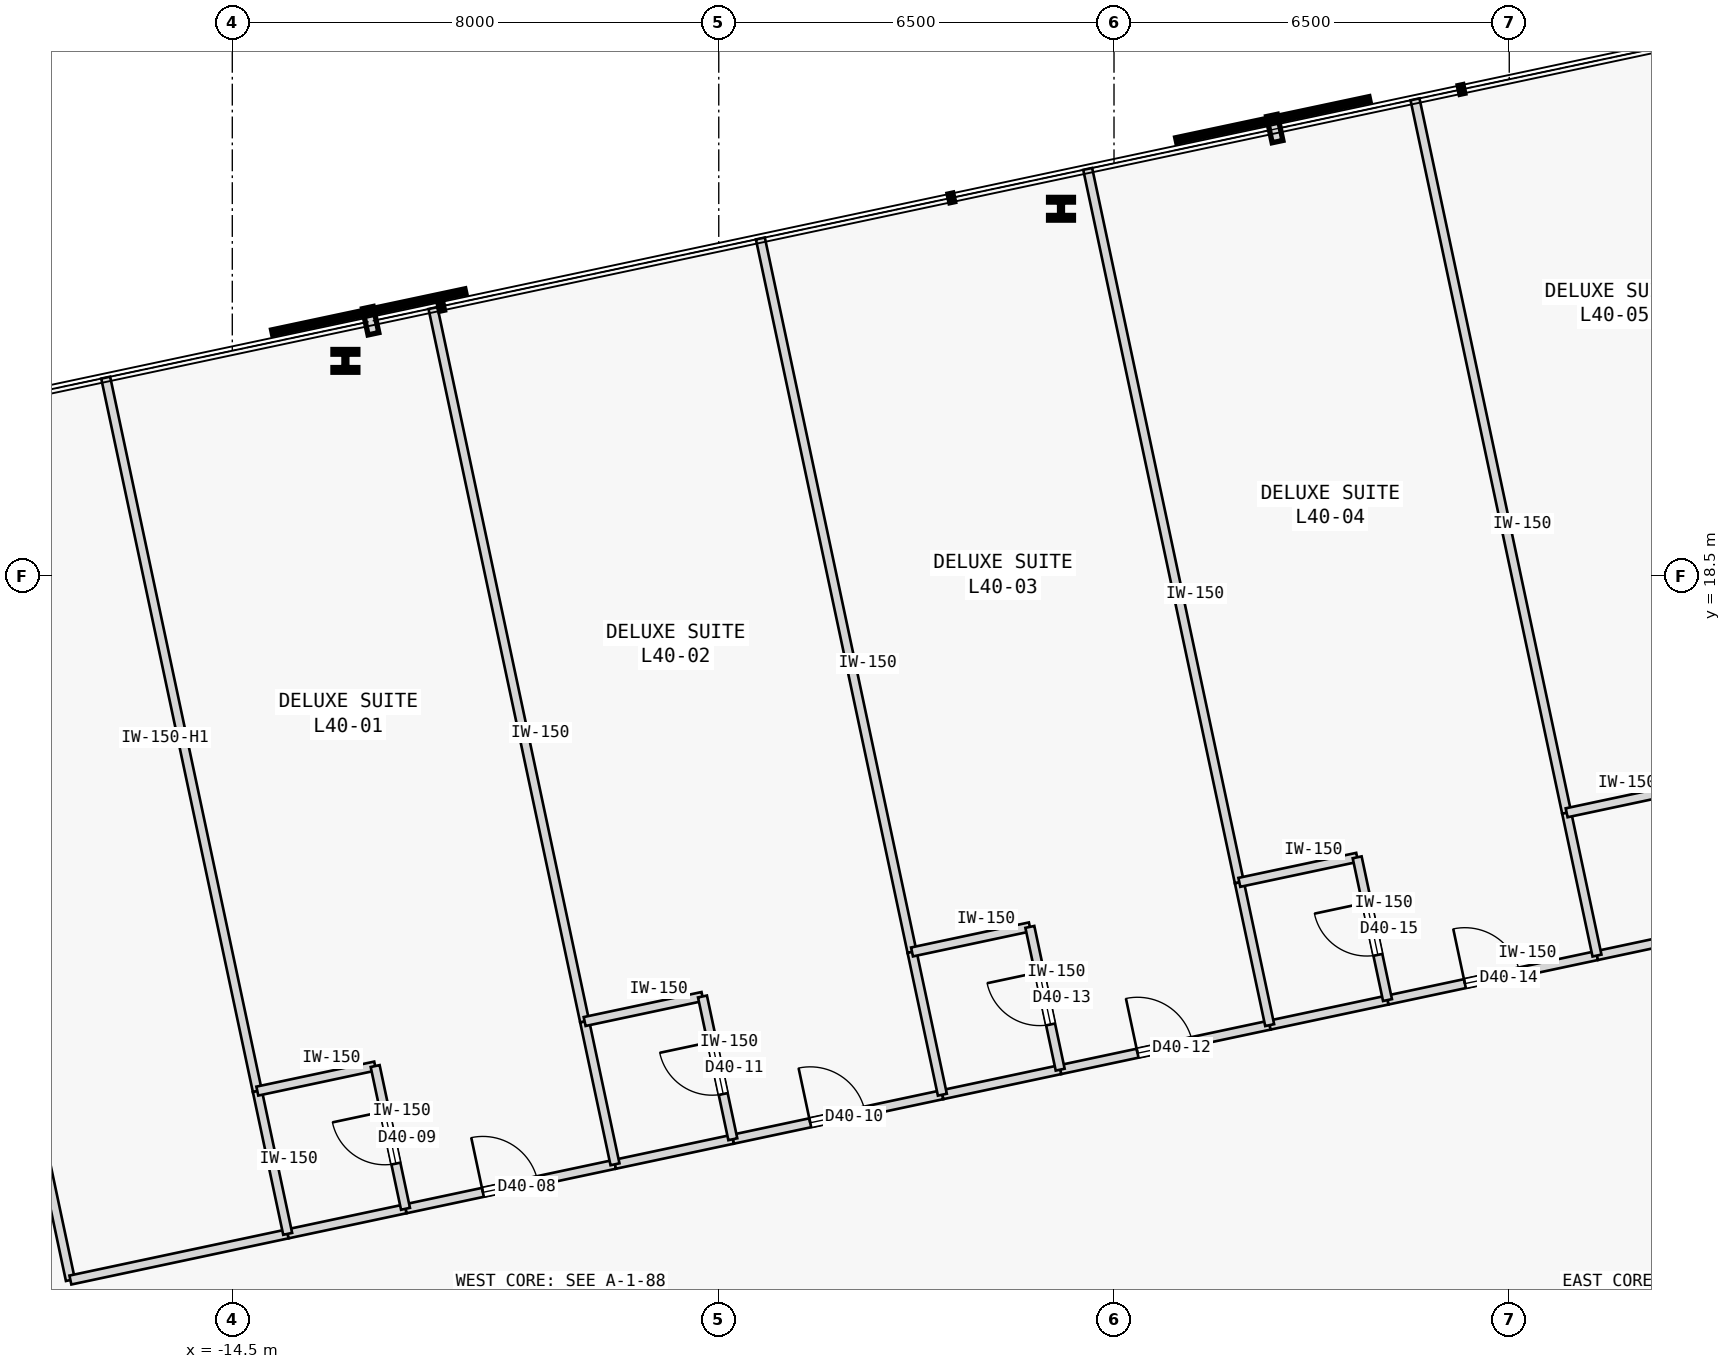
"""IFC4 building model, lengths in metres.
Left out: names, types, materials, properties, quantities, classifications, styles, units other than length and angle.
Written with IfcOpenShell. Run it as: python <this file> out.ifc"""

import sys

from ifc_helpers import new_model, si_unit, direction, frame, frame_2d, origin, origin_2d, place, context, subcontext, project, spatial, rectangle, i_section, extrude, element, fill, save


model = new_model("IFC4")
c1 = context("Model", 3, precision=1e-05, world=origin(), true_north=direction((0.0, 1.0)))
c2 = subcontext(c1, "Body", "Model", "MODEL_VIEW")
j1 = project(units=[si_unit("LENGTHUNIT", "METRE"), si_unit("PLANEANGLEUNIT", "RADIAN")], contexts=[c1])
p1 = place(None, origin())
s1 = spatial("IfcSite", under=j1, at=p1, CompositionType="ELEMENT")
p2 = place(p1, origin())
s2 = spatial("IfcBuilding", under=s1, at=p2, CompositionType="ELEMENT")
p3 = place(p2, frame((0.0, 0.0, 158.2)))
s3 = spatial("IfcBuildingStorey", under=s2, at=p3, CompositionType="ELEMENT", Elevation=158.2)
for number, where, z_axis, x_axis in (
    (1, (-0.872, 24.543, 0.0), (0.0, 0.0, 1.0), (1.0, 0.0, 0.0)),
    (2, (-12.64, 22.042, 0.0), (0.0, 0.0, 1.0), (1.0, 0.0, 0.0)),
):
    element("IfcColumn", number, at=place(p3, frame(where, z_axis=z_axis, x_axis=x_axis)), inside=s3, PredefinedType="COLUMN", context=c2, shape_type="SweptSolid", body=[
        extrude(i_section(OverallWidth=0.409, OverallDepth=0.374, WebThickness=0.048, FlangeThickness=0.077, FilletRadius=0.015, at=origin_2d()), origin(), (0.0, 0.0, 1.0), 3.4),
    ])
p4 = place(p3, frame((-17.162, 6.926, 0.0), z_axis=(0.0, 0.0, 1.0), x_axis=(-0.207911421929, 0.978147657888, 0.0)))
e3 = element("IfcWall", 3, at=p4, inside=s3, PredefinedType="PARTITIONING", context=c2, shape_type="SweptSolid", body=[
    extrude(rectangle(XDim=13.195, YDim=0.15, at=frame_2d((6.598, 0.0))), origin(), (0.0, 0.0, 1.0), 2.725),
])
p5 = place(p4, frame((6.137, 0.0, 0.0)))
e4 = element("IfcOpeningElement", 4, at=p5, cuts=e3, PredefinedType="OPENING", context=c2, shape_type="SweptSolid", body=[
    extrude(rectangle(XDim=0.92, YDim=2.15, at=frame_2d((0.46, 1.075))), frame((0.0, 0.085, 0.0), z_axis=(0.0, -1.0, 0.0), x_axis=(1.0, 0.0, 0.0)), (0.0, 0.0, 1.0), 0.17),
])
p6 = place(p3, frame((-17.162, 6.926, 0.0), z_axis=(0.0, 0.0, 1.0), x_axis=(0.978147299501, 0.207913108004, 0.0)))
e5 = element("IfcWall", 5, at=p6, inside=s3, PredefinedType="PARTITIONING", context=c2, shape_type="SweptSolid", body=[
    extrude(rectangle(XDim=3.653, YDim=0.15, at=frame_2d((1.827, 0.0))), origin(), (0.0, 0.0, 1.0), 3.175),
])
p7 = place(p3, frame((-11.652, 8.097, 0.0), z_axis=(0.0, 0.0, 1.0), x_axis=(0.978153036861, 0.207886114205, 0.0)))
e6 = element("IfcWall", 6, at=p7, inside=s3, PredefinedType="PARTITIONING", context=c2, shape_type="SweptSolid", body=[
    extrude(rectangle(XDim=3.522, YDim=0.15, at=frame_2d((1.761, 0.0))), origin(), (0.0, 0.0, 1.0), 3.175),
])
p8 = place(p7, frame((1.301, 0.0, 0.0)))
e7 = element("IfcOpeningElement", 7, at=p8, cuts=e6, PredefinedType="OPENING", context=c2, shape_type="SweptSolid", body=[
    extrude(rectangle(XDim=0.92, YDim=2.15, at=frame_2d((0.46, 1.075))), frame((0.0, 0.085, 0.0), z_axis=(0.0, -1.0, 0.0), x_axis=(1.0, 0.0, 0.0)), (0.0, 0.0, 1.0), 0.17),
])
p9 = place(p3, frame((-13.589, 7.685, 0.0), z_axis=(0.0, 0.0, 1.0), x_axis=(0.97811873796, 0.208047433175, 0.0)))
e8 = element("IfcWall", 8, at=p9, inside=s3, PredefinedType="PARTITIONING", context=c2, shape_type="SweptSolid", body=[
    extrude(rectangle(XDim=1.981, YDim=0.15, at=frame_2d((0.99, 0.0))), origin(), (0.0, 0.0, 1.0), 3.175),
])
p10 = place(p3, frame((-6.269, 9.241, 0.0), z_axis=(0.0, 0.0, 1.0), x_axis=(0.978150924733, 0.207896052016, 0.0)))
e9 = element("IfcWall", 9, at=p10, inside=s3, PredefinedType="PARTITIONING", context=c2, shape_type="SweptSolid", body=[
    extrude(rectangle(XDim=3.523, YDim=0.15, at=frame_2d((1.761, 0.0))), origin(), (0.0, 0.0, 1.0), 3.175),
])
p11 = place(p10, frame((1.302, 0.0, 0.0)))
e10 = element("IfcOpeningElement", 10, at=p11, cuts=e9, PredefinedType="OPENING", context=c2, shape_type="SweptSolid", body=[
    extrude(rectangle(XDim=0.92, YDim=2.15, at=frame_2d((0.46, 1.075))), frame((0.0, 0.085, 0.0), z_axis=(0.0, -1.0, 0.0), x_axis=(1.0, 0.0, 0.0)), (0.0, 0.0, 1.0), 0.17),
])
p12 = place(p3, frame((-8.207, 8.83, 0.0), z_axis=(0.0, 0.0, 1.0), x_axis=(0.978149140323, 0.20790444749, 0.0)))
e11 = element("IfcWall", 11, at=p12, inside=s3, PredefinedType="PARTITIONING", context=c2, shape_type="SweptSolid", body=[
    extrude(rectangle(XDim=1.981, YDim=0.15, at=frame_2d((0.99, 0.0))), origin(), (0.0, 0.0, 1.0), 3.175),
])
p13 = place(p3, frame((-0.885, 10.386, 0.0), z_axis=(0.0, 0.0, 1.0), x_axis=(0.978153036861, 0.207886114205, 0.0)))
e12 = element("IfcWall", 12, at=p13, inside=s3, PredefinedType="PARTITIONING", context=c2, shape_type="SweptSolid", body=[
    extrude(rectangle(XDim=3.522, YDim=0.15, at=frame_2d((1.761, 0.0))), origin(), (0.0, 0.0, 1.0), 3.175),
])
p14 = place(p13, frame((1.301, 0.0, 0.0)))
e13 = element("IfcOpeningElement", 13, at=p14, cuts=e12, PredefinedType="OPENING", context=c2, shape_type="SweptSolid", body=[
    extrude(rectangle(XDim=0.92, YDim=2.15, at=frame_2d((0.46, 1.075))), frame((0.0, 0.085, 0.0), z_axis=(0.0, -1.0, 0.0), x_axis=(1.0, 0.0, 0.0)), (0.0, 0.0, 1.0), 0.17),
])
p15 = place(p3, frame((-2.823, 9.974, 0.0), z_axis=(0.0, 0.0, 1.0), x_axis=(0.978149140323, 0.20790444749, 0.0)))
e14 = element("IfcWall", 14, at=p15, inside=s3, PredefinedType="PARTITIONING", context=c2, shape_type="SweptSolid", body=[
    extrude(rectangle(XDim=1.981, YDim=0.15, at=frame_2d((0.99, 0.0))), origin(), (0.0, 0.0, 1.0), 3.175),
])
p16 = place(p3, frame((4.498, 11.53, 0.0), z_axis=(0.0, 0.0, 1.0), x_axis=(0.978135941404, 0.207966536089, 0.0)))
e15 = element("IfcWall", 15, at=p16, inside=s3, PredefinedType="PARTITIONING", context=c2, shape_type="SweptSolid", body=[
    extrude(rectangle(XDim=3.522, YDim=0.15, at=frame_2d((1.761, 0.0))), origin(), (0.0, 0.0, 1.0), 3.175),
])
p17 = place(p16, frame((1.301, 0.0, 0.0)))
e16 = element("IfcOpeningElement", 16, at=p17, cuts=e15, PredefinedType="OPENING", context=c2, shape_type="SweptSolid", body=[
    extrude(rectangle(XDim=0.92, YDim=2.15, at=frame_2d((0.46, 1.075))), frame((0.0, 0.085, 0.0), z_axis=(0.0, -1.0, 0.0), x_axis=(1.0, 0.0, 0.0)), (0.0, 0.0, 1.0), 0.17),
])
p18 = place(p3, frame((2.56, 11.118, 0.0), z_axis=(0.0, 0.0, 1.0), x_axis=(0.978149140323, 0.20790444749, 0.0)))
e17 = element("IfcWall", 17, at=p18, inside=s3, PredefinedType="PARTITIONING", context=c2, shape_type="SweptSolid", body=[
    extrude(rectangle(XDim=1.981, YDim=0.15, at=frame_2d((0.99, 0.0))), origin(), (0.0, 0.0, 1.0), 3.175),
])
p19 = place(p3, frame((7.943, 12.262, 0.0), z_axis=(0.0, 0.0, 1.0), x_axis=(0.978146728319, 0.207915795165, 0.0)))
e18 = element("IfcWall", 18, at=p19, inside=s3, PredefinedType="PARTITIONING", context=c2, shape_type="SweptSolid", body=[
    extrude(rectangle(XDim=2.15, YDim=0.15, at=frame_2d((1.075, 0.0))), origin(), (0.0, 0.0, 1.0), 3.175),
])
p20 = place(p3, frame((-14.088, 10.033, 0.0), z_axis=(0.0, 0.0, 1.0), x_axis=(-0.207910848762, 0.978147779718, 0.0)))
e19 = element("IfcWall", 19, at=p20, inside=s3, PredefinedType="PARTITIONING", context=c2, shape_type="SweptSolid", body=[
    extrude(rectangle(XDim=11.995, YDim=0.15, at=frame_2d((5.998, 0.0))), origin(), (0.0, 0.0, 1.0), 2.725),
])
p21 = place(p3, frame((-13.589, 7.685, 0.0), z_axis=(0.0, 0.0, 1.0), x_axis=(-0.207917150959, 0.978146440129, 0.0)))
e20 = element("IfcWall", 20, at=p21, inside=s3, PredefinedType="PARTITIONING", context=c2, shape_type="SweptSolid", body=[
    extrude(rectangle(XDim=2.4, YDim=0.15, at=frame_2d((1.2, 0.0))), origin(), (0.0, 0.0, 1.0), 3.175),
])
p22 = place(p3, frame((-14.088, 10.033, 0.0), z_axis=(0.0, 0.0, 1.0), x_axis=(0.978149140323, 0.20790444749, 0.0)))
e21 = element("IfcWall", 21, at=p22, inside=s3, PredefinedType="PARTITIONING", context=c2, shape_type="SweptSolid", body=[
    extrude(rectangle(XDim=1.981, YDim=0.15, at=frame_2d((0.99, 0.0))), origin(), (0.0, 0.0, 1.0), 3.175),
])
p23 = place(p3, frame((-11.652, 8.097, 0.0), z_axis=(0.0, 0.0, 1.0), x_axis=(-0.207840504985, 0.978162729042, 0.0)))
e22 = element("IfcWall", 22, at=p23, inside=s3, PredefinedType="PARTITIONING", context=c2, shape_type="SweptSolid", body=[
    extrude(rectangle(XDim=2.4, YDim=0.15, at=frame_2d((1.2, 0.0))), origin(), (0.0, 0.0, 1.0), 3.175),
])
p24 = place(p23, frame((0.76, 0.0, 0.0)))
e23 = element("IfcOpeningElement", 23, at=p24, cuts=e22, PredefinedType="OPENING", context=c2, shape_type="SweptSolid", body=[
    extrude(rectangle(XDim=0.88, YDim=2.15, at=frame_2d((0.44, 1.075))), frame((0.0, 0.085, 0.0), z_axis=(0.0, -1.0, 0.0), x_axis=(1.0, 0.0, 0.0)), (0.0, 0.0, 1.0), 0.17),
])
p25 = place(p3, frame((-8.706, 11.177, 0.0), z_axis=(0.0, 0.0, 1.0), x_axis=(-0.207910848762, 0.978147779718, 0.0)))
e24 = element("IfcWall", 24, at=p25, inside=s3, PredefinedType="PARTITIONING", context=c2, shape_type="SweptSolid", body=[
    extrude(rectangle(XDim=11.995, YDim=0.15, at=frame_2d((5.998, 0.0))), origin(), (0.0, 0.0, 1.0), 3.175),
])
p26 = place(p3, frame((-8.207, 8.83, 0.0), z_axis=(0.0, 0.0, 1.0), x_axis=(-0.207937840262, 0.978142042133, 0.0)))
e25 = element("IfcWall", 25, at=p26, inside=s3, PredefinedType="PARTITIONING", context=c2, shape_type="SweptSolid", body=[
    extrude(rectangle(XDim=2.4, YDim=0.15, at=frame_2d((1.2, 0.0))), origin(), (0.0, 0.0, 1.0), 3.175),
])
p27 = place(p3, frame((-8.706, 11.177, 0.0), z_axis=(0.0, 0.0, 1.0), x_axis=(0.978149140323, 0.20790444749, 0.0)))
e26 = element("IfcWall", 26, at=p27, inside=s3, PredefinedType="PARTITIONING", context=c2, shape_type="SweptSolid", body=[
    extrude(rectangle(XDim=1.981, YDim=0.15, at=frame_2d((0.99, 0.0))), origin(), (0.0, 0.0, 1.0), 3.175),
])
p28 = place(p3, frame((-6.269, 9.241, 0.0), z_axis=(0.0, 0.0, 1.0), x_axis=(-0.207937840262, 0.978142042133, 0.0)))
e27 = element("IfcWall", 27, at=p28, inside=s3, PredefinedType="PARTITIONING", context=c2, shape_type="SweptSolid", body=[
    extrude(rectangle(XDim=2.4, YDim=0.15, at=frame_2d((1.2, 0.0))), origin(), (0.0, 0.0, 1.0), 3.175),
])
p29 = place(p28, frame((0.76, 0.0, 0.0)))
e28 = element("IfcOpeningElement", 28, at=p29, cuts=e27, PredefinedType="OPENING", context=c2, shape_type="SweptSolid", body=[
    extrude(rectangle(XDim=0.88, YDim=2.15, at=frame_2d((0.44, 1.075))), frame((0.0, 0.085, 0.0), z_axis=(0.0, -1.0, 0.0), x_axis=(1.0, 0.0, 0.0)), (0.0, 0.0, 1.0), 0.17),
])
p30 = place(p3, frame((-3.322, 12.321, 0.0), z_axis=(0.0, 0.0, 1.0), x_axis=(-0.207910848762, 0.978147779718, 0.0)))
e29 = element("IfcWall", 29, at=p30, inside=s3, PredefinedType="PARTITIONING", context=c2, shape_type="SweptSolid", body=[
    extrude(rectangle(XDim=11.995, YDim=0.15, at=frame_2d((5.998, 0.0))), origin(), (0.0, 0.0, 1.0), 3.175),
])
p31 = place(p3, frame((-2.823, 9.974, 0.0), z_axis=(0.0, 0.0, 1.0), x_axis=(-0.207937840262, 0.978142042133, 0.0)))
e30 = element("IfcWall", 30, at=p31, inside=s3, PredefinedType="PARTITIONING", context=c2, shape_type="SweptSolid", body=[
    extrude(rectangle(XDim=2.4, YDim=0.15, at=frame_2d((1.2, 0.0))), origin(), (0.0, 0.0, 1.0), 3.175),
])
p32 = place(p3, frame((-3.322, 12.321, 0.0), z_axis=(0.0, 0.0, 1.0), x_axis=(0.978124071753, 0.208022355187, 0.0)))
e31 = element("IfcWall", 31, at=p32, inside=s3, PredefinedType="PARTITIONING", context=c2, shape_type="SweptSolid", body=[
    extrude(rectangle(XDim=1.981, YDim=0.15, at=frame_2d((0.991, 0.0))), origin(), (0.0, 0.0, 1.0), 3.175),
])
p33 = place(p3, frame((-0.885, 10.386, 0.0), z_axis=(0.0, 0.0, 1.0), x_axis=(-0.207917150959, 0.978146440129, 0.0)))
e32 = element("IfcWall", 32, at=p33, inside=s3, PredefinedType="PARTITIONING", context=c2, shape_type="SweptSolid", body=[
    extrude(rectangle(XDim=2.4, YDim=0.15, at=frame_2d((1.2, 0.0))), origin(), (0.0, 0.0, 1.0), 3.175),
])
p34 = place(p33, frame((0.76, 0.0, 0.0)))
e33 = element("IfcOpeningElement", 33, at=p34, cuts=e32, PredefinedType="OPENING", context=c2, shape_type="SweptSolid", body=[
    extrude(rectangle(XDim=0.88, YDim=2.15, at=frame_2d((0.44, 1.075))), frame((0.0, 0.085, 0.0), z_axis=(0.0, -1.0, 0.0), x_axis=(1.0, 0.0, 0.0)), (0.0, 0.0, 1.0), 0.17),
])
p35 = place(p3, frame((2.061, 13.466, 0.0), z_axis=(0.0, 0.0, 1.0), x_axis=(-0.207910848762, 0.978147779718, 0.0)))
e34 = element("IfcWall", 34, at=p35, inside=s3, PredefinedType="PARTITIONING", context=c2, shape_type="SweptSolid", body=[
    extrude(rectangle(XDim=11.995, YDim=0.15, at=frame_2d((5.998, 0.0))), origin(), (0.0, 0.0, 1.0), 3.175),
])
p36 = place(p3, frame((2.56, 11.118, 0.0), z_axis=(0.0, 0.0, 1.0), x_axis=(-0.207917150959, 0.978146440129, 0.0)))
e35 = element("IfcWall", 35, at=p36, inside=s3, PredefinedType="PARTITIONING", context=c2, shape_type="SweptSolid", body=[
    extrude(rectangle(XDim=2.4, YDim=0.15, at=frame_2d((1.2, 0.0))), origin(), (0.0, 0.0, 1.0), 3.175),
])
p37 = place(p3, frame((2.061, 13.466, 0.0), z_axis=(0.0, 0.0, 1.0), x_axis=(0.978149140323, 0.20790444749, 0.0)))
e36 = element("IfcWall", 36, at=p37, inside=s3, PredefinedType="PARTITIONING", context=c2, shape_type="SweptSolid", body=[
    extrude(rectangle(XDim=1.981, YDim=0.15, at=frame_2d((0.99, 0.0))), origin(), (0.0, 0.0, 1.0), 3.175),
])
p38 = place(p3, frame((4.498, 11.53, 0.0), z_axis=(0.0, 0.0, 1.0), x_axis=(-0.207917150959, 0.978146440129, 0.0)))
e37 = element("IfcWall", 37, at=p38, inside=s3, PredefinedType="PARTITIONING", context=c2, shape_type="SweptSolid", body=[
    extrude(rectangle(XDim=2.4, YDim=0.15, at=frame_2d((1.2, 0.0))), origin(), (0.0, 0.0, 1.0), 3.175),
])
p39 = place(p38, frame((0.76, 0.0, 0.0)))
e38 = element("IfcOpeningElement", 38, at=p39, cuts=e37, PredefinedType="OPENING", context=c2, shape_type="SweptSolid", body=[
    extrude(rectangle(XDim=0.88, YDim=2.15, at=frame_2d((0.44, 1.075))), frame((0.0, 0.085, 0.0), z_axis=(0.0, -1.0, 0.0), x_axis=(1.0, 0.0, 0.0)), (0.0, 0.0, 1.0), 0.17),
])
p40 = place(p3, frame((7.444, 14.61, 0.0), z_axis=(0.0, 0.0, 1.0), x_axis=(-0.207910848762, 0.978147779718, 0.0)))
e39 = element("IfcWall", 39, at=p40, inside=s3, PredefinedType="PARTITIONING", context=c2, shape_type="SweptSolid", body=[
    extrude(rectangle(XDim=11.995, YDim=0.15, at=frame_2d((5.998, 0.0))), origin(), (0.0, 0.0, 1.0), 3.175),
])
p41 = place(p3, frame((7.943, 12.262, 0.0), z_axis=(0.0, 0.0, 1.0), x_axis=(-0.207937840262, 0.978142042133, 0.0)))
e40 = element("IfcWall", 40, at=p41, inside=s3, PredefinedType="PARTITIONING", context=c2, shape_type="SweptSolid", body=[
    extrude(rectangle(XDim=2.4, YDim=0.15, at=frame_2d((1.2, 0.0))), origin(), (0.0, 0.0, 1.0), 3.175),
])
p42 = place(p3, frame((7.444, 14.61, 0.0), z_axis=(0.0, 0.0, 1.0), x_axis=(0.978151636287, 0.207892704126, 0.0)))
e41 = element("IfcWall", 41, at=p42, inside=s3, PredefinedType="PARTITIONING", context=c2, shape_type="SweptSolid", body=[
    extrude(rectangle(XDim=2.15, YDim=0.15, at=frame_2d((1.075, 0.0))), origin(), (0.0, 0.0, 1.0), 3.175),
])
p43 = place(p8, origin())
e42 = element("IfcDoor", 42, at=p43, inside=s3, OperationType="SINGLE_SWING_LEFT", PredefinedType="DOOR", context=c2, shape_type="SweptSolid", body=[
    extrude(rectangle(XDim=0.92, YDim=2.15, at=frame_2d((0.46, 1.075))), frame((0.0, 0.025, 0.0), z_axis=(0.0, -1.0, 0.0), x_axis=(1.0, 0.0, 0.0)), (0.0, 0.0, 1.0), 0.05),
])
fill(e7, e42)
p44 = place(p24, origin())
e43 = element("IfcDoor", 43, at=p44, inside=s3, OperationType="SINGLE_SWING_RIGHT", PredefinedType="DOOR", context=c2, shape_type="SweptSolid", body=[
    extrude(rectangle(XDim=0.88, YDim=2.15, at=frame_2d((0.44, 1.075))), frame((0.0, 0.025, 0.0), z_axis=(0.0, -1.0, 0.0), x_axis=(1.0, 0.0, 0.0)), (0.0, 0.0, 1.0), 0.05),
])
fill(e23, e43)
p45 = place(p11, origin())
e44 = element("IfcDoor", 44, at=p45, inside=s3, OperationType="SINGLE_SWING_LEFT", PredefinedType="DOOR", context=c2, shape_type="SweptSolid", body=[
    extrude(rectangle(XDim=0.92, YDim=2.15, at=frame_2d((0.46, 1.075))), frame((0.0, 0.025, 0.0), z_axis=(0.0, -1.0, 0.0), x_axis=(1.0, 0.0, 0.0)), (0.0, 0.0, 1.0), 0.05),
])
fill(e10, e44)
p46 = place(p29, origin())
e45 = element("IfcDoor", 45, at=p46, inside=s3, OperationType="SINGLE_SWING_RIGHT", PredefinedType="DOOR", context=c2, shape_type="SweptSolid", body=[
    extrude(rectangle(XDim=0.88, YDim=2.15, at=frame_2d((0.44, 1.075))), frame((0.0, 0.025, 0.0), z_axis=(0.0, -1.0, 0.0), x_axis=(1.0, 0.0, 0.0)), (0.0, 0.0, 1.0), 0.05),
])
fill(e28, e45)
p47 = place(p14, origin())
e46 = element("IfcDoor", 46, at=p47, inside=s3, OperationType="SINGLE_SWING_LEFT", PredefinedType="DOOR", context=c2, shape_type="SweptSolid", body=[
    extrude(rectangle(XDim=0.92, YDim=2.15, at=frame_2d((0.46, 1.075))), frame((0.0, 0.025, 0.0), z_axis=(0.0, -1.0, 0.0), x_axis=(1.0, 0.0, 0.0)), (0.0, 0.0, 1.0), 0.05),
])
fill(e13, e46)
p48 = place(p34, origin())
e47 = element("IfcDoor", 47, at=p48, inside=s3, OperationType="SINGLE_SWING_RIGHT", PredefinedType="DOOR", context=c2, shape_type="SweptSolid", body=[
    extrude(rectangle(XDim=0.88, YDim=2.15, at=frame_2d((0.44, 1.075))), frame((0.0, 0.025, 0.0), z_axis=(0.0, -1.0, 0.0), x_axis=(1.0, 0.0, 0.0)), (0.0, 0.0, 1.0), 0.05),
])
fill(e33, e47)
p49 = place(p17, origin())
e48 = element("IfcDoor", 48, at=p49, inside=s3, OperationType="SINGLE_SWING_LEFT", PredefinedType="DOOR", context=c2, shape_type="SweptSolid", body=[
    extrude(rectangle(XDim=0.92, YDim=2.15, at=frame_2d((0.46, 1.075))), frame((0.0, 0.025, 0.0), z_axis=(0.0, -1.0, 0.0), x_axis=(1.0, 0.0, 0.0)), (0.0, 0.0, 1.0), 0.05),
])
fill(e16, e48)
p50 = place(p39, origin())
e49 = element("IfcDoor", 49, at=p50, inside=s3, OperationType="SINGLE_SWING_RIGHT", PredefinedType="DOOR", context=c2, shape_type="SweptSolid", body=[
    extrude(rectangle(XDim=0.88, YDim=2.15, at=frame_2d((0.44, 1.075))), frame((0.0, 0.025, 0.0), z_axis=(0.0, -1.0, 0.0), x_axis=(1.0, 0.0, 0.0)), (0.0, 0.0, 1.0), 0.05),
])
fill(e38, e49)
save(model, sys.argv[1])
